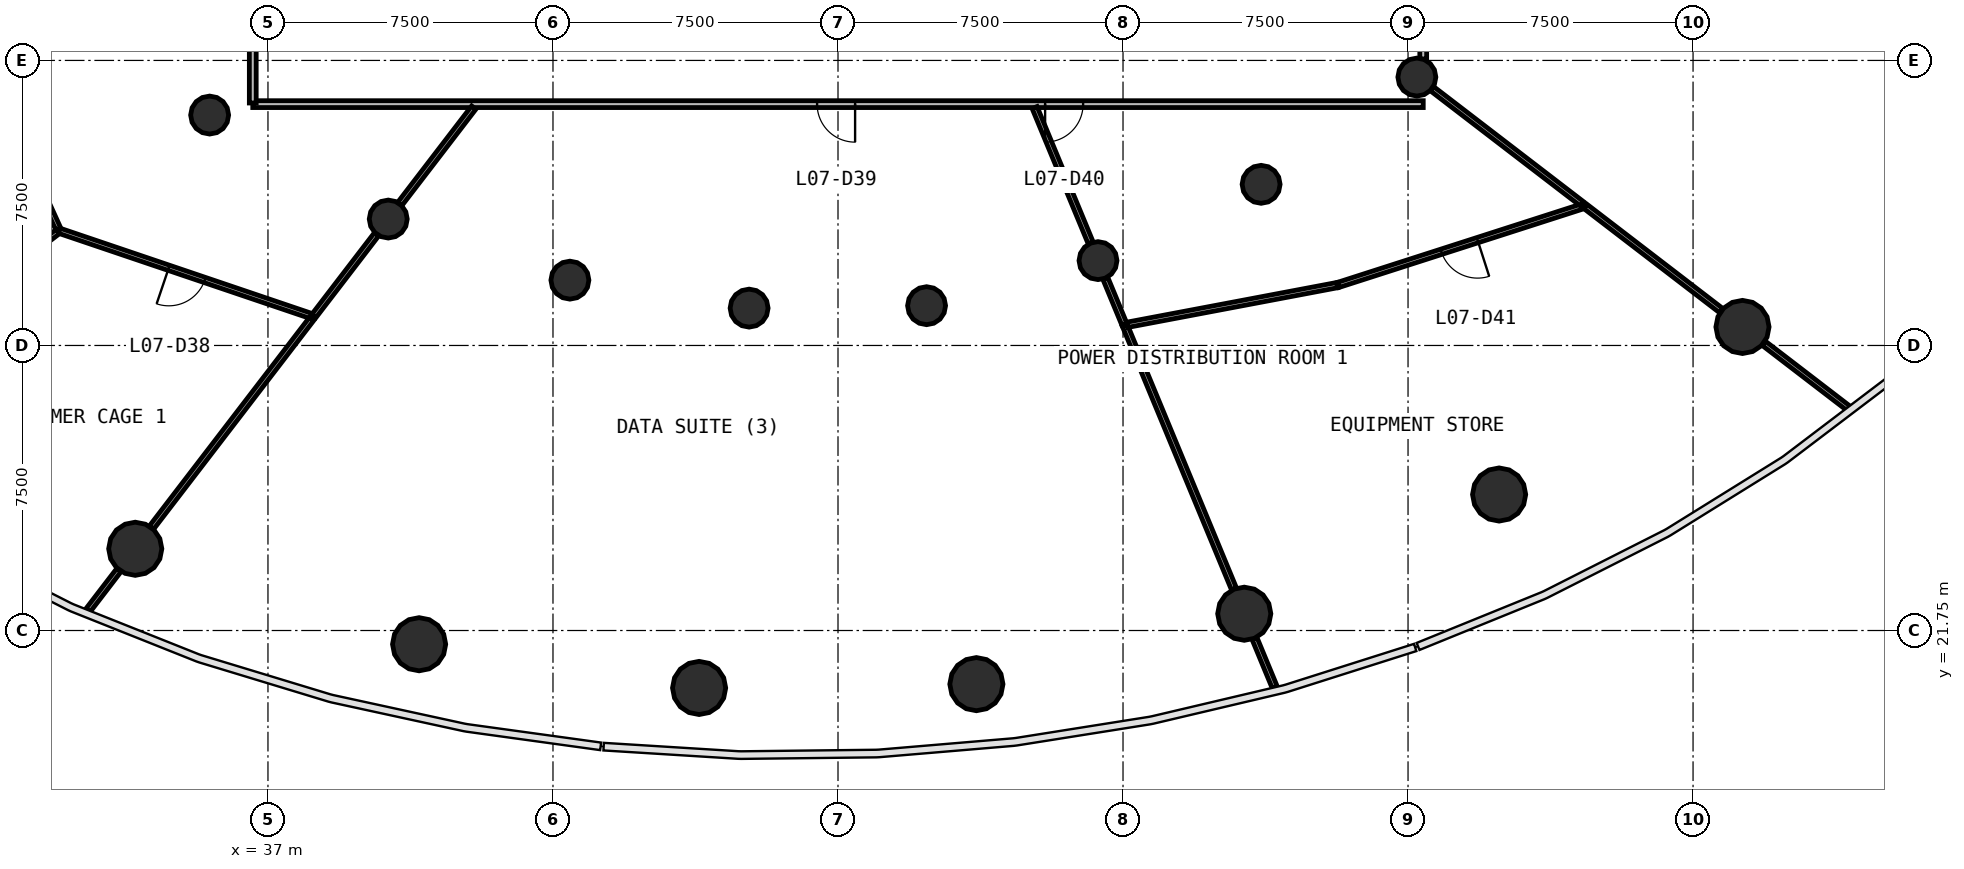
"""IFC4 building model, lengths in metres.
Left out: names, types, materials, properties, quantities, classifications, styles, units other than length and angle.
Written with IfcOpenShell. Run it as: python <this file> out.ifc"""

import sys

from ifc_helpers import new_model, si_unit, direction, frame, frame_2d, origin, origin_2d, place, context, subcontext, project, spatial, rectangle, circle, extrude, source, transform, mapped, element, fill, save


model = new_model("IFC4")
c1 = context("Model", 3, precision=1e-05, world=origin(), true_north=direction((0.0, 1.0)))
c2 = subcontext(c1, "Body", "Model", "MODEL_VIEW")
j1 = project(units=[si_unit("LENGTHUNIT", "METRE"), si_unit("PLANEANGLEUNIT", "RADIAN")], contexts=[c1])
p1 = place(None, origin())
s1 = spatial("IfcSite", under=j1, at=p1, CompositionType="ELEMENT")
p2 = place(p1, origin())
s2 = spatial("IfcBuilding", under=s1, at=p2, CompositionType="ELEMENT")
p3 = place(p2, frame((0.0, 0.0, 31.4)))
s3 = spatial("IfcBuildingStorey", under=s2, at=p3, CompositionType="ELEMENT", Elevation=31.4)
m1 = source(origin(), c2, "Body", "SweptSolid", [
    extrude(circle(Radius=0.7, at=origin_2d()), origin(), (0.0, 0.0, 1.0), 4.4),
])
for number, where, z_axis, x_axis in (
    (1, (33.508, 23.9, 0.0), (0.0, 0.0, 1.0), (1.0, 0.0, 0.0)),
    (2, (40.977, 21.389, 0.0), (0.0, 0.0, 1.0), (1.0, 0.0, 0.0)),
    (3, (48.345, 20.239, 0.0), (0.0, 0.0, 1.0), (1.0, 0.0, 0.0)),
    (4, (55.642, 20.339, 0.0), (0.0, 0.0, 1.0), (1.0, 0.0, 0.0)),
    (5, (62.69, 22.191, 0.0), (0.0, 0.0, 1.0), (1.0, 0.0, 0.0)),
    (6, (69.396, 25.328, 0.0), (0.0, 0.0, 1.0), (1.0, 0.0, 0.0)),
    (7, (75.801, 29.737, 0.0), (0.0, 0.0, 1.0), (1.0, 0.0, 0.0)),
):
    element("IfcColumn", number, at=place(p3, frame(where, z_axis=z_axis, x_axis=x_axis)), inside=s3, PredefinedType="COLUMN", context=c2, shape_type="MappedRepresentation", body=[
        mapped(m1, transform((0.0, 0.0, 0.0), scale=1.0)),
    ])
m2 = source(origin(), c2, "Body", "SweptSolid", [
    extrude(circle(Radius=0.5, at=origin_2d()), origin(), (0.0, 0.0, 1.0), 4.4),
])
for number, where, z_axis, x_axis in (
    (8, (35.465, 35.312, 0.0), (0.0, 0.0, 1.0), (1.0, 0.0, 0.0)),
    (9, (40.165, 32.576, 0.0), (0.0, 0.0, 1.0), (1.0, 0.0, 0.0)),
    (10, (44.945, 30.969, 0.0), (0.0, 0.0, 1.0), (1.0, 0.0, 0.0)),
    (11, (49.661, 30.233, 0.0), (0.0, 0.0, 1.0), (1.0, 0.0, 0.0)),
    (12, (54.331, 30.297, 0.0), (0.0, 0.0, 1.0), (1.0, 0.0, 0.0)),
    (13, (58.842, 31.482, 0.0), (0.0, 0.0, 1.0), (1.0, 0.0, 0.0)),
    (14, (63.134, 33.49, 0.0), (0.0, 0.0, 1.0), (1.0, 0.0, 0.0)),
    (15, (67.232, 36.312, 0.0), (0.0, 0.0, 1.0), (1.0, 0.0, 0.0)),
):
    element("IfcColumn", number, at=place(p3, frame(where, z_axis=z_axis, x_axis=x_axis)), inside=s3, PredefinedType="COLUMN", context=c2, shape_type="MappedRepresentation", body=[
        mapped(m2, transform((0.0, 0.0, 0.0), scale=1.0)),
    ])
p4 = place(p3, frame((67.4, 35.6, 0.0), z_axis=(0.0, 0.0, 1.0), x_axis=(-1.0, 0.0, 0.0)))
e16 = element("IfcWall", 16, at=p4, inside=s3, PredefinedType="PARTITIONING", context=c2, shape_type="SweptSolid", body=[
    extrude(rectangle(XDim=30.8, YDim=0.18, at=frame_2d((15.4, 0.0))), origin(), (0.0, 0.0, 1.0), 3.05),
])
p5 = place(p4, frame((14.95, 0.0, 0.0)))
e17 = element("IfcOpeningElement", 17, at=p5, cuts=e16, PredefinedType="OPENING", context=c2, shape_type="SweptSolid", body=[
    extrude(rectangle(XDim=1.0, YDim=2.1, at=frame_2d((0.5, 1.05))), frame((0.0, 0.1, 0.0), z_axis=(0.0, -1.0, 0.0), x_axis=(1.0, 0.0, 0.0)), (0.0, 0.0, 1.0), 0.2),
])
p6 = place(p4, frame((8.95, 0.0, 0.0)))
e18 = element("IfcOpeningElement", 18, at=p6, cuts=e16, PredefinedType="OPENING", context=c2, shape_type="SweptSolid", body=[
    extrude(rectangle(XDim=1.0, YDim=2.1, at=frame_2d((0.5, 1.05))), frame((0.0, 0.1, 0.0), z_axis=(0.0, -1.0, 0.0), x_axis=(1.0, 0.0, 0.0)), (0.0, 0.0, 1.0), 0.2),
])
p7 = place(p3, frame((67.4, 60.37, 0.0), z_axis=(0.0, 0.0, 1.0), x_axis=(0.0, -1.0, 0.0)))
e19 = element("IfcWall", 19, at=p7, inside=s3, PredefinedType="PARTITIONING", context=c2, shape_type="SweptSolid", body=[
    extrude(rectangle(XDim=23.583, YDim=0.18, at=frame_2d((11.791, 0.0))), origin(), (0.0, 0.0, 1.0), 3.05),
])
p8 = place(p7, frame((11.833, 0.0, 0.0)))
e20 = element("IfcOpeningElement", 20, at=p8, cuts=e19, PredefinedType="OPENING", context=c2, shape_type="SweptSolid", body=[
    extrude(rectangle(XDim=0.9, YDim=2.1, at=frame_2d((0.45, 1.05))), frame((0.0, 0.1, 0.0), z_axis=(0.0, -1.0, 0.0), x_axis=(1.0, 0.0, 0.0)), (0.0, 0.0, 1.0), 0.2),
])
p9 = place(p7, frame((10.433, 0.0, 0.0)))
e21 = element("IfcOpeningElement", 21, at=p9, cuts=e19, PredefinedType="OPENING", context=c2, shape_type="SweptSolid", body=[
    extrude(rectangle(XDim=0.9, YDim=2.1, at=frame_2d((0.45, 1.05))), frame((0.0, 0.1, 0.0), z_axis=(0.0, -1.0, 0.0), x_axis=(1.0, 0.0, 0.0)), (0.0, 0.0, 1.0), 0.2),
])
p10 = place(p7, frame((7.833, 0.0, 0.0)))
e22 = element("IfcOpeningElement", 22, at=p10, cuts=e19, PredefinedType="OPENING", context=c2, shape_type="SweptSolid", body=[
    extrude(rectangle(XDim=0.9, YDim=2.1, at=frame_2d((0.45, 1.05))), frame((0.0, 0.1, 0.0), z_axis=(0.0, -1.0, 0.0), x_axis=(1.0, 0.0, 0.0)), (0.0, 0.0, 1.0), 0.2),
])
p11 = place(p7, frame((14.732, 0.0, 0.0)))
e23 = element("IfcOpeningElement", 23, at=p11, cuts=e19, PredefinedType="OPENING", context=c2, shape_type="SweptSolid", body=[
    extrude(rectangle(XDim=1.0, YDim=2.1, at=frame_2d((0.5, 1.05))), frame((0.0, 0.1, 0.0), z_axis=(0.0, -1.0, 0.0), x_axis=(1.0, 0.0, 0.0)), (0.0, 0.0, 1.0), 0.2),
])
p12 = place(p3, frame((36.6, 35.63, 0.0), z_axis=(0.0, 0.0, 1.0), x_axis=(0.0, 1.0, 0.0)))
e24 = element("IfcWall", 24, at=p12, inside=s3, PredefinedType="PARTITIONING", context=c2, shape_type="SweptSolid", body=[
    extrude(rectangle(XDim=23.583, YDim=0.18, at=frame_2d((11.791, 0.0))), origin(), (0.0, 0.0, 1.0), 3.05),
])
p13 = place(p12, frame((14.732, 0.0, 0.0)))
e25 = element("IfcOpeningElement", 25, at=p13, cuts=e24, PredefinedType="OPENING", context=c2, shape_type="SweptSolid", body=[
    extrude(rectangle(XDim=1.0, YDim=2.1, at=frame_2d((0.5, 1.05))), frame((0.0, 0.1, 0.0), z_axis=(0.0, -1.0, 0.0), x_axis=(1.0, 0.0, 0.0)), (0.0, 0.0, 1.0), 0.2),
])
p14 = place(p12, frame((11.333, 0.0, 0.0)))
e26 = element("IfcOpeningElement", 26, at=p14, cuts=e24, PredefinedType="OPENING", context=c2, shape_type="SweptSolid", body=[
    extrude(rectangle(XDim=1.0, YDim=2.1, at=frame_2d((0.5, 1.05))), frame((0.0, 0.1, 0.0), z_axis=(0.0, -1.0, 0.0), x_axis=(1.0, 0.0, 0.0)), (0.0, 0.0, 1.0), 0.2),
])
p15 = place(p12, frame((4.532, 0.0, 0.0)))
e27 = element("IfcOpeningElement", 27, at=p15, cuts=e24, PredefinedType="OPENING", context=c2, shape_type="SweptSolid", body=[
    extrude(rectangle(XDim=1.0, YDim=2.1, at=frame_2d((0.5, 1.05))), frame((0.0, 0.1, 0.0), z_axis=(0.0, -1.0, 0.0), x_axis=(1.0, 0.0, 0.0)), (0.0, 0.0, 1.0), 0.2),
])
p16 = place(p3, frame((59.546, 29.781, 0.0), z_axis=(0.0, 0.0, 1.0), x_axis=(0.382684835198, -0.923878951438, 0.0)))
e28 = element("IfcWall", 28, at=p16, inside=s3, PredefinedType="PARTITIONING", context=c2, shape_type="SweptSolid", body=[
    extrude(rectangle(XDim=7.51, YDim=0.14, at=frame_2d((3.755, 0.0))), origin(), (0.0, 0.0, 1.0), 3.05),
])
p17 = place(p3, frame((38.193, 30.006, 0.0), z_axis=(0.0, 0.0, 1.0), x_axis=(-0.947190130732, 0.320672506219, 0.0)))
e29 = element("IfcWall", 29, at=p17, inside=s3, PredefinedType="PARTITIONING", context=c2, shape_type="SweptSolid", body=[
    extrude(rectangle(XDim=7.064, YDim=0.14, at=frame_2d((3.532, 0.0))), origin(), (0.0, 0.0, 1.0), 3.05),
])
p18 = place(p17, frame((3.014, 0.0, 0.0)))
e30 = element("IfcOpeningElement", 30, at=p18, cuts=e29, PredefinedType="OPENING", context=c2, shape_type="SweptSolid", body=[
    extrude(rectangle(XDim=1.0, YDim=2.1, at=frame_2d((0.5, 1.05))), frame((0.0, 0.08, 0.0), z_axis=(0.0, -1.0, 0.0), x_axis=(1.0, 0.0, 0.0)), (0.0, 0.0, 1.0), 0.16),
])
p19 = place(p3, frame((38.148, 29.947, 0.0), z_axis=(0.0, 0.0, 1.0), x_axis=(-0.608772297796, -0.793345000259, 0.0)))
e31 = element("IfcWall", 31, at=p19, inside=s3, PredefinedType="PARTITIONING", context=c2, shape_type="SweptSolid", body=[
    extrude(rectangle(XDim=6.918, YDim=0.14, at=frame_2d((3.459, 0.0))), origin(), (0.0, 0.0, 1.0), 3.05),
])
p20 = place(p3, frame((71.644, 32.927, 0.0), z_axis=(0.0, 0.0, 1.0), x_axis=(-0.952001311543, -0.306093944436, 0.0)))
e32 = element("IfcWall", 32, at=p20, inside=s3, PredefinedType="PARTITIONING", context=c2, shape_type="SweptSolid", body=[
    extrude(rectangle(XDim=6.806, YDim=0.14, at=frame_2d((3.403, 0.0))), origin(), (0.0, 0.0, 1.0), 3.05),
])
p21 = place(p20, frame((2.956, 0.0, 0.0)))
e33 = element("IfcOpeningElement", 33, at=p21, cuts=e32, PredefinedType="OPENING", context=c2, shape_type="SweptSolid", body=[
    extrude(rectangle(XDim=1.0, YDim=2.1, at=frame_2d((0.5, 1.05))), frame((0.0, 0.08, 0.0), z_axis=(0.0, -1.0, 0.0), x_axis=(1.0, 0.0, 0.0)), (0.0, 0.0, 1.0), 0.16),
])
p22 = place(p3, frame((31.49, 32.299, 0.0), z_axis=(0.0, 0.0, 1.0), x_axis=(-0.413875066619, 0.910333691144, 0.0)))
e34 = element("IfcWall", 34, at=p22, inside=s3, PredefinedType="PARTITIONING", context=c2, shape_type="SweptSolid", body=[
    extrude(rectangle(XDim=6.631, YDim=0.14, at=frame_2d((3.315, 0.0))), origin(), (0.0, 0.0, 1.0), 3.05),
])
p23 = place(p22, frame((2.781, 0.0, 0.0)))
e35 = element("IfcOpeningElement", 35, at=p23, cuts=e34, PredefinedType="OPENING", context=c2, shape_type="SweptSolid", body=[
    extrude(rectangle(XDim=1.0, YDim=2.1, at=frame_2d((0.5, 1.05))), frame((0.0, 0.08, 0.0), z_axis=(0.0, -1.0, 0.0), x_axis=(1.0, 0.0, 0.0)), (0.0, 0.0, 1.0), 0.16),
])
p24 = place(p3, frame((31.478, 32.253, 0.0), z_axis=(0.0, 0.0, 1.0), x_axis=(-0.793362398318, -0.608749624177, 0.0)))
e36 = element("IfcWall", 36, at=p24, inside=s3, PredefinedType="PARTITIONING", context=c2, shape_type="SweptSolid", body=[
    extrude(rectangle(XDim=5.993, YDim=0.14, at=frame_2d((2.997, 0.0))), origin(), (0.0, 0.0, 1.0), 3.05),
])
p25 = place(p3, frame((59.617, 29.795, 0.0), z_axis=(0.0, 0.0, 1.0), x_axis=(0.982595988328, 0.185755548296, 0.0)))
e37 = element("IfcWall", 37, at=p25, inside=s3, PredefinedType="PARTITIONING", context=c2, shape_type="SweptSolid", body=[
    extrude(rectangle(XDim=5.616, YDim=0.14, at=frame_2d((2.808, 0.0))), origin(), (0.0, 0.0, 1.0), 3.05),
])
p26 = place(p3, frame((67.633, 36.005, 0.0), z_axis=(0.0, 0.0, 1.0), x_axis=(0.793344630943, -0.608772779084, 0.0)))
e38 = element("IfcWall", 38, at=p26, inside=s3, PredefinedType="PARTITIONING", context=c2, shape_type="SweptSolid", body=[
    extrude(rectangle(XDim=4.971, YDim=0.14, at=frame_2d((2.485, 0.0))), origin(), (0.0, 0.0, 1.0), 3.05),
])
p27 = place(p3, frame((71.667, 32.908, 0.0), z_axis=(0.0, 0.0, 1.0), x_axis=(0.793390880135, -0.608712503009, 0.0)))
e39 = element("IfcWall", 39, at=p27, inside=s3, PredefinedType="PARTITIONING", context=c2, shape_type="SweptSolid", body=[
    extrude(rectangle(XDim=4.505, YDim=0.14, at=frame_2d((2.253, 0.0))), origin(), (0.0, 0.0, 1.0), 3.05),
])
p28 = place(p3, frame((57.174, 35.51, 0.0), z_axis=(0.0, 0.0, 1.0), x_axis=(0.382644558062, -0.923895633817, 0.0)))
e40 = element("IfcWall", 40, at=p28, inside=s3, PredefinedType="PARTITIONING", context=c2, shape_type="SweptSolid", body=[
    extrude(rectangle(XDim=3.854, YDim=0.14, at=frame_2d((1.927, 0.0))), origin(), (0.0, 0.0, 1.0), 3.05),
])
p29 = place(p3, frame((42.416, 35.51, 0.0), z_axis=(0.0, 0.0, 1.0), x_axis=(-0.60874605662, -0.793365135703, 0.0)))
e41 = element("IfcWall", 41, at=p29, inside=s3, PredefinedType="PARTITIONING", context=c2, shape_type="SweptSolid", body=[
    extrude(rectangle(XDim=3.194, YDim=0.14, at=frame_2d((1.597, 0.0))), origin(), (0.0, 0.0, 1.0), 3.05),
])
p30 = place(p3, frame((76.359, 29.309, 0.0), z_axis=(0.0, 0.0, 1.0), x_axis=(0.793282017179, -0.608854367826, 0.0)))
e42 = element("IfcWall", 42, at=p30, inside=s3, PredefinedType="PARTITIONING", context=c2, shape_type="SweptSolid", body=[
    extrude(rectangle(XDim=2.812, YDim=0.14, at=frame_2d((1.406, 0.0))), origin(), (0.0, 0.0, 1.0), 3.05),
])
p31 = place(p3, frame((39.858, 32.176, 0.0), z_axis=(0.0, 0.0, 1.0), x_axis=(-0.608785764782, -0.793334666202, 0.0)))
e43 = element("IfcWall", 43, at=p31, inside=s3, PredefinedType="PARTITIONING", context=c2, shape_type="SweptSolid", body=[
    extrude(rectangle(XDim=2.705, YDim=0.14, at=frame_2d((1.353, 0.0))), origin(), (0.0, 0.0, 1.0), 3.05),
])
p32 = place(p3, frame((62.96, 21.54, 0.0), z_axis=(0.0, 0.0, 1.0), x_axis=(0.382579541027, -0.923922558869, 0.0)))
e44 = element("IfcWall", 44, at=p32, inside=s3, PredefinedType="PARTITIONING", context=c2, shape_type="SweptSolid", body=[
    extrude(rectangle(XDim=1.389, YDim=0.14, at=frame_2d((0.694, 0.0))), origin(), (0.0, 0.0, 1.0), 3.05),
])
p33 = place(p3, frame((33.079, 23.342, 0.0), z_axis=(0.0, 0.0, 1.0), x_axis=(-0.608845512284, -0.793288813845, 0.0)))
e45 = element("IfcWall", 45, at=p33, inside=s3, PredefinedType="PARTITIONING", context=c2, shape_type="SweptSolid", body=[
    extrude(rectangle(XDim=1.337, YDim=0.14, at=frame_2d((0.668, 0.0))), origin(), (0.0, 0.0, 1.0), 3.05),
])
p34 = place(p3, frame((59.035, 31.016, 0.0), z_axis=(0.0, 0.0, 1.0), x_axis=(0.382769952813, -0.923843689822, 0.0)))
e46 = element("IfcWall", 46, at=p34, inside=s3, PredefinedType="PARTITIONING", context=c2, shape_type="SweptSolid", body=[
    extrude(rectangle(XDim=1.306, YDim=0.14, at=frame_2d((0.653, 0.0))), origin(), (0.0, 0.0, 1.0), 3.05),
])
m3 = source(origin(), c2, "Body", "SweptSolid", [
    extrude(rectangle(XDim=1.0, YDim=2.1, at=frame_2d((0.5, 1.05))), frame((0.0, 0.025, 0.0), z_axis=(0.0, -1.0, 0.0), x_axis=(1.0, 0.0, 0.0)), (0.0, 0.0, 1.0), 0.05),
])
p35 = place(p18, origin())
e47 = element("IfcDoor", 47, at=p35, inside=s3, OperationType="SINGLE_SWING_RIGHT", PredefinedType="DOOR", context=c2, shape_type="MappedRepresentation", body=[
    mapped(m3, transform((0.0, 0.0, 0.0), scale=1.0)),
])
fill(e30, e47)
p36 = place(p5, origin())
e48 = element("IfcDoor", 48, at=p36, inside=s3, OperationType="SINGLE_SWING_LEFT", PredefinedType="DOOR", context=c2, shape_type="MappedRepresentation", body=[
    mapped(m3, transform((0.0, 0.0, 0.0), scale=1.0)),
])
fill(e17, e48)
p37 = place(p6, origin())
e49 = element("IfcDoor", 49, at=p37, inside=s3, OperationType="SINGLE_SWING_RIGHT", PredefinedType="DOOR", context=c2, shape_type="MappedRepresentation", body=[
    mapped(m3, transform((0.0, 0.0, 0.0), scale=1.0)),
])
fill(e18, e49)
p38 = place(p21, origin())
e50 = element("IfcDoor", 50, at=p38, inside=s3, OperationType="SINGLE_SWING_LEFT", PredefinedType="DOOR", context=c2, shape_type="MappedRepresentation", body=[
    mapped(m3, transform((0.0, 0.0, 0.0), scale=1.0)),
])
fill(e33, e50)
save(model, sys.argv[1])
